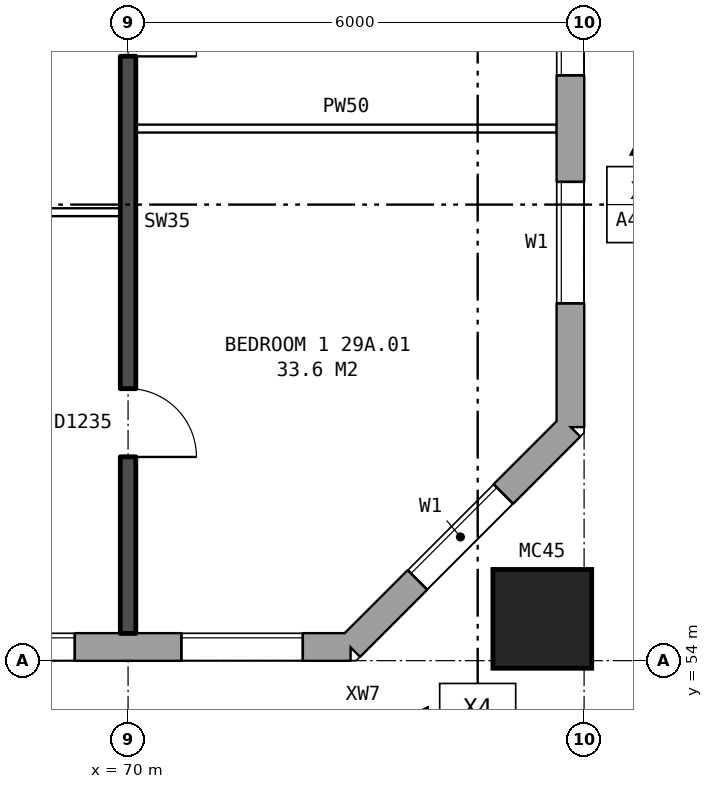
"""IFC4 building model, lengths in metres.
Left out: names, types, materials, properties, quantities, classifications, styles, units other than length and angle.
Written with IfcOpenShell. Run it as: python <this file> out.ifc"""

import sys

from ifc_helpers import new_model, si_unit, direction, frame, frame_2d, origin, origin_2d, place, context, subcontext, project, spatial, rectangle, hollow_rectangle, extrude, element, fill, save


model = new_model("IFC4")
c1 = context("Model", 3, precision=1e-05, world=origin(), true_north=direction((0.0, 1.0)))
c2 = subcontext(c1, "Body", "Model", "MODEL_VIEW")
j1 = project(units=[si_unit("LENGTHUNIT", "METRE"), si_unit("PLANEANGLEUNIT", "RADIAN")], contexts=[c1])
p1 = place(None, origin())
s1 = spatial("IfcSite", under=j1, at=p1, CompositionType="ELEMENT")
p2 = place(p1, origin())
s2 = spatial("IfcBuilding", under=s1, at=p2, CompositionType="ELEMENT")
p3 = place(p2, frame((0.0, 0.0, 105.7)))
s3 = spatial("IfcBuildingStorey", under=s2, at=p3, CompositionType="ELEMENT", Elevation=105.7)
p4 = place(p3, frame((75.45, 54.55, 0.0), z_axis=(0.0, 0.0, 1.0), x_axis=(1.0, 0.0, 0.0)))
e1 = element("IfcColumn", 1, at=p4, inside=s3, PredefinedType="COLUMN", context=c2, shape_type="SweptSolid", body=[
    extrude(hollow_rectangle(XDim=1.3, YDim=1.3, WallThickness=0.07, at=origin_2d()), origin(), (0.0, 0.0, 1.0), 3.1),
])
p5 = place(p3, frame((28.075, 54.18, 0.0), z_axis=(0.0, 0.0, 1.0), x_axis=(1.0, 0.0, 0.0)))
e2 = element("IfcWall", 2, at=p5, inside=s3, PredefinedType="STANDARD", context=c2, shape_type="SweptSolid", body=[
    extrude(rectangle(XDim=44.851, YDim=0.36, at=frame_2d((22.425, 0.0))), origin(), (0.0, 0.0, 1.0), 2.85),
])
p6 = place(p5, frame((0.625, 0.0, 0.8)))
e3 = element("IfcOpeningElement", 3, at=p6, cuts=e2, PredefinedType="OPENING", context=c2, shape_type="SweptSolid", body=[
    extrude(rectangle(XDim=1.6, YDim=1.8, at=frame_2d((0.8, 0.9))), frame((0.0, 0.19, 0.0), z_axis=(0.0, -1.0, 0.0), x_axis=(1.0, 0.0, 0.0)), (0.0, 0.0, 1.0), 0.38),
])
p7 = place(p5, frame((3.625, 0.0, 0.8)))
e4 = element("IfcOpeningElement", 4, at=p7, cuts=e2, PredefinedType="OPENING", context=c2, shape_type="SweptSolid", body=[
    extrude(rectangle(XDim=1.6, YDim=1.8, at=frame_2d((0.8, 0.9))), frame((0.0, 0.19, 0.0), z_axis=(0.0, -1.0, 0.0), x_axis=(1.0, 0.0, 0.0)), (0.0, 0.0, 1.0), 0.38),
])
p8 = place(p5, frame((6.625, 0.0, 0.8)))
e5 = element("IfcOpeningElement", 5, at=p8, cuts=e2, PredefinedType="OPENING", context=c2, shape_type="SweptSolid", body=[
    extrude(rectangle(XDim=1.6, YDim=1.8, at=frame_2d((0.8, 0.9))), frame((0.0, 0.19, 0.0), z_axis=(0.0, -1.0, 0.0), x_axis=(1.0, 0.0, 0.0)), (0.0, 0.0, 1.0), 0.38),
])
p9 = place(p5, frame((8.525, 0.0, 0.8)))
e6 = element("IfcOpeningElement", 6, at=p9, cuts=e2, PredefinedType="OPENING", context=c2, shape_type="SweptSolid", body=[
    extrude(rectangle(XDim=1.4, YDim=1.8, at=frame_2d((0.7, 0.9))), frame((0.0, 0.19, 0.0), z_axis=(0.0, -1.0, 0.0), x_axis=(1.0, 0.0, 0.0)), (0.0, 0.0, 1.0), 0.38),
])
p10 = place(p5, frame((13.175, 0.0, 0.8)))
e7 = element("IfcOpeningElement", 7, at=p10, cuts=e2, PredefinedType="OPENING", context=c2, shape_type="SweptSolid", body=[
    extrude(rectangle(XDim=1.0, YDim=0.9, at=frame_2d((0.5, 0.45))), frame((0.0, 0.19, 0.0), z_axis=(0.0, -1.0, 0.0), x_axis=(1.0, 0.0, 0.0)), (0.0, 0.0, 1.0), 0.38),
])
p11 = place(p5, frame((15.625, 0.0, 0.8)))
e8 = element("IfcOpeningElement", 8, at=p11, cuts=e2, PredefinedType="OPENING", context=c2, shape_type="SweptSolid", body=[
    extrude(rectangle(XDim=1.6, YDim=1.8, at=frame_2d((0.8, 0.9))), frame((0.0, 0.19, 0.0), z_axis=(0.0, -1.0, 0.0), x_axis=(1.0, 0.0, 0.0)), (0.0, 0.0, 1.0), 0.38),
])
p12 = place(p5, frame((18.625, 0.0, 0.8)))
e9 = element("IfcOpeningElement", 9, at=p12, cuts=e2, PredefinedType="OPENING", context=c2, shape_type="SweptSolid", body=[
    extrude(rectangle(XDim=1.6, YDim=1.8, at=frame_2d((0.8, 0.9))), frame((0.0, 0.19, 0.0), z_axis=(0.0, -1.0, 0.0), x_axis=(1.0, 0.0, 0.0)), (0.0, 0.0, 1.0), 0.38),
])
p13 = place(p5, frame((21.625, 0.0, 0.8)))
e10 = element("IfcOpeningElement", 10, at=p13, cuts=e2, PredefinedType="OPENING", context=c2, shape_type="SweptSolid", body=[
    extrude(rectangle(XDim=1.6, YDim=1.8, at=frame_2d((0.8, 0.9))), frame((0.0, 0.19, 0.0), z_axis=(0.0, -1.0, 0.0), x_axis=(1.0, 0.0, 0.0)), (0.0, 0.0, 1.0), 0.38),
])
p14 = place(p5, frame((24.625, 0.0, 0.8)))
e11 = element("IfcOpeningElement", 11, at=p14, cuts=e2, PredefinedType="OPENING", context=c2, shape_type="SweptSolid", body=[
    extrude(rectangle(XDim=1.6, YDim=1.8, at=frame_2d((0.8, 0.9))), frame((0.0, 0.19, 0.0), z_axis=(0.0, -1.0, 0.0), x_axis=(1.0, 0.0, 0.0)), (0.0, 0.0, 1.0), 0.38),
])
p15 = place(p5, frame((27.625, 0.0, 0.8)))
e12 = element("IfcOpeningElement", 12, at=p15, cuts=e2, PredefinedType="OPENING", context=c2, shape_type="SweptSolid", body=[
    extrude(rectangle(XDim=1.6, YDim=1.8, at=frame_2d((0.8, 0.9))), frame((0.0, 0.19, 0.0), z_axis=(0.0, -1.0, 0.0), x_axis=(1.0, 0.0, 0.0)), (0.0, 0.0, 1.0), 0.38),
])
p16 = place(p5, frame((30.125, 0.0, 0.15)))
e13 = element("IfcOpeningElement", 13, at=p16, cuts=e2, PredefinedType="OPENING", context=c2, shape_type="SweptSolid", body=[
    extrude(rectangle(XDim=1.2, YDim=1.8, at=frame_2d((0.6, 0.9))), frame((0.0, 0.19, 0.0), z_axis=(0.0, -1.0, 0.0), x_axis=(1.0, 0.0, 0.0)), (0.0, 0.0, 1.0), 0.38),
])
p17 = place(p5, frame((33.075, 0.0, 1.6)))
e14 = element("IfcOpeningElement", 14, at=p17, cuts=e2, PredefinedType="OPENING", context=c2, shape_type="SweptSolid", body=[
    extrude(rectangle(XDim=0.6, YDim=0.9, at=frame_2d((0.3, 0.45))), frame((0.0, 0.19, 0.0), z_axis=(0.0, -1.0, 0.0), x_axis=(1.0, 0.0, 0.0)), (0.0, 0.0, 1.0), 0.38),
])
p18 = place(p5, frame((36.625, 0.0, 0.8)))
e15 = element("IfcOpeningElement", 15, at=p18, cuts=e2, PredefinedType="OPENING", context=c2, shape_type="SweptSolid", body=[
    extrude(rectangle(XDim=1.6, YDim=1.8, at=frame_2d((0.8, 0.9))), frame((0.0, 0.19, 0.0), z_axis=(0.0, -1.0, 0.0), x_axis=(1.0, 0.0, 0.0)), (0.0, 0.0, 1.0), 0.38),
])
p19 = place(p5, frame((39.625, 0.0, 0.8)))
e16 = element("IfcOpeningElement", 16, at=p19, cuts=e2, PredefinedType="OPENING", context=c2, shape_type="SweptSolid", body=[
    extrude(rectangle(XDim=1.6, YDim=1.8, at=frame_2d((0.8, 0.9))), frame((0.0, 0.19, 0.0), z_axis=(0.0, -1.0, 0.0), x_axis=(1.0, 0.0, 0.0)), (0.0, 0.0, 1.0), 0.38),
])
p20 = place(p5, frame((42.625, 0.0, 0.8)))
e17 = element("IfcOpeningElement", 17, at=p20, cuts=e2, PredefinedType="OPENING", context=c2, shape_type="SweptSolid", body=[
    extrude(rectangle(XDim=1.6, YDim=1.8, at=frame_2d((0.8, 0.9))), frame((0.0, 0.19, 0.0), z_axis=(0.0, -1.0, 0.0), x_axis=(1.0, 0.0, 0.0)), (0.0, 0.0, 1.0), 0.38),
])
p21 = place(p5, frame((10.225, 0.0, 1.1)))
e18 = element("IfcOpeningElement", 18, at=p21, cuts=e2, PredefinedType="OPENING", context=c2, shape_type="SweptSolid", body=[
    extrude(rectangle(XDim=0.8, YDim=1.5, at=frame_2d((0.4, 0.75))), frame((0.0, 0.19, 0.0), z_axis=(0.0, -1.0, 0.0), x_axis=(1.0, 0.0, 0.0)), (0.0, 0.0, 1.0), 0.38),
])
p22 = place(p5, frame((14.475, 0.0, 0.8)))
e19 = element("IfcOpeningElement", 19, at=p22, cuts=e2, PredefinedType="OPENING", context=c2, shape_type="SweptSolid", body=[
    extrude(rectangle(XDim=0.8, YDim=1.8, at=frame_2d((0.4, 0.9))), frame((0.0, 0.19, 0.0), z_axis=(0.0, -1.0, 0.0), x_axis=(1.0, 0.0, 0.0)), (0.0, 0.0, 1.0), 0.38),
])
p23 = place(p5, frame((31.625, 0.0, 0.25)))
e20 = element("IfcOpeningElement", 20, at=p23, cuts=e2, PredefinedType="OPENING", context=c2, shape_type="SweptSolid", body=[
    extrude(rectangle(XDim=0.8, YDim=0.9, at=frame_2d((0.4, 0.45))), frame((0.0, 0.19, 0.0), z_axis=(0.0, -1.0, 0.0), x_axis=(1.0, 0.0, 0.0)), (0.0, 0.0, 1.0), 0.38),
])
p24 = place(p5, frame((34.125, 0.0, 0.8)))
e21 = element("IfcOpeningElement", 21, at=p24, cuts=e2, PredefinedType="OPENING", context=c2, shape_type="SweptSolid", body=[
    extrude(rectangle(XDim=1.6, YDim=1.8, at=frame_2d((0.8, 0.9))), frame((0.0, 0.19, 0.0), z_axis=(0.0, -1.0, 0.0), x_axis=(1.0, 0.0, 0.0)), (0.0, 0.0, 1.0), 0.38),
])
p25 = place(p3, frame((72.925, 54.18, 0.0), z_axis=(0.0, 0.0, 1.0), x_axis=(0.707106781187, 0.707106781187, 0.0)))
e22 = element("IfcWall", 22, at=p25, inside=s3, PredefinedType="STANDARD", context=c2, shape_type="SweptSolid", body=[
    extrude(rectangle(XDim=4.094, YDim=0.36, at=frame_2d((2.047, 0.0))), origin(), (0.0, 0.0, 1.0), 2.85),
])
p26 = place(p25, frame((1.247, 0.0, 0.8)))
e23 = element("IfcOpeningElement", 23, at=p26, cuts=e22, PredefinedType="OPENING", context=c2, shape_type="SweptSolid", body=[
    extrude(rectangle(XDim=1.6, YDim=1.8, at=frame_2d((0.8, 0.9))), frame((0.0, 0.19, 0.0), z_axis=(0.0, -1.0, 0.0), x_axis=(1.0, 0.0, 0.0)), (0.0, 0.0, 1.0), 0.38),
])
p27 = place(p3, frame((75.82, 57.075, 0.0), z_axis=(0.0, 0.0, 1.0), x_axis=(0.0, 1.0, 0.0)))
e24 = element("IfcWall", 24, at=p27, inside=s3, PredefinedType="STANDARD", context=c2, shape_type="SweptSolid", body=[
    extrude(rectangle(XDim=25.851, YDim=0.36, at=frame_2d((12.925, 0.0))), origin(), (0.0, 0.0, 1.0), 2.85),
])
p28 = place(p27, frame((1.625, 0.0, 0.8)))
e25 = element("IfcOpeningElement", 25, at=p28, cuts=e24, PredefinedType="OPENING", context=c2, shape_type="SweptSolid", body=[
    extrude(rectangle(XDim=1.6, YDim=1.8, at=frame_2d((0.8, 0.9))), frame((0.0, 0.19, 0.0), z_axis=(0.0, -1.0, 0.0), x_axis=(1.0, 0.0, 0.0)), (0.0, 0.0, 1.0), 0.38),
])
p29 = place(p27, frame((4.625, 0.0, 0.8)))
e26 = element("IfcOpeningElement", 26, at=p29, cuts=e24, PredefinedType="OPENING", context=c2, shape_type="SweptSolid", body=[
    extrude(rectangle(XDim=1.6, YDim=1.8, at=frame_2d((0.8, 0.9))), frame((0.0, 0.19, 0.0), z_axis=(0.0, -1.0, 0.0), x_axis=(1.0, 0.0, 0.0)), (0.0, 0.0, 1.0), 0.38),
])
p30 = place(p27, frame((19.625, 0.0, 0.8)))
e27 = element("IfcOpeningElement", 27, at=p30, cuts=e24, PredefinedType="OPENING", context=c2, shape_type="SweptSolid", body=[
    extrude(rectangle(XDim=1.6, YDim=1.8, at=frame_2d((0.8, 0.9))), frame((0.0, 0.19, 0.0), z_axis=(0.0, -1.0, 0.0), x_axis=(1.0, 0.0, 0.0)), (0.0, 0.0, 1.0), 0.38),
])
p31 = place(p27, frame((22.625, 0.0, 0.8)))
e28 = element("IfcOpeningElement", 28, at=p31, cuts=e24, PredefinedType="OPENING", context=c2, shape_type="SweptSolid", body=[
    extrude(rectangle(XDim=1.6, YDim=1.8, at=frame_2d((0.8, 0.9))), frame((0.0, 0.19, 0.0), z_axis=(0.0, -1.0, 0.0), x_axis=(1.0, 0.0, 0.0)), (0.0, 0.0, 1.0), 0.38),
])
p32 = place(p3, frame((64.1, 59.9, 0.0), z_axis=(0.0, 0.0, 1.0), x_axis=(1.0, 0.0, 0.0)))
e29 = element("IfcWall", 29, at=p32, inside=s3, PredefinedType="PARTITIONING", context=c2, shape_type="SweptSolid", body=[
    extrude(rectangle(XDim=5.8, YDim=0.1, at=frame_2d((2.9, 0.0))), origin(), (0.0, 0.0, 1.0), 2.85),
])
p33 = place(p32, frame((3.6, 0.0, 0.0)))
e30 = element("IfcOpeningElement", 30, at=p33, cuts=e29, PredefinedType="OPENING", context=c2, shape_type="SweptSolid", body=[
    extrude(rectangle(XDim=0.9, YDim=2.1, at=frame_2d((0.45, 1.05))), frame((0.0, 0.06, 0.0), z_axis=(0.0, -1.0, 0.0), x_axis=(1.0, 0.0, 0.0)), (0.0, 0.0, 1.0), 0.12),
])
p34 = place(p32, frame((0.7, 0.0, 0.0)))
e31 = element("IfcOpeningElement", 31, at=p34, cuts=e29, PredefinedType="OPENING", context=c2, shape_type="SweptSolid", body=[
    extrude(rectangle(XDim=0.9, YDim=2.1, at=frame_2d((0.45, 1.05))), frame((0.0, 0.06, 0.0), z_axis=(0.0, -1.0, 0.0), x_axis=(1.0, 0.0, 0.0)), (0.0, 0.0, 1.0), 0.12),
])
p35 = place(p3, frame((70.1, 61.0, 0.0), z_axis=(0.0, 0.0, 1.0), x_axis=(1.0, 0.0, 0.0)))
e32 = element("IfcWall", 32, at=p35, inside=s3, PredefinedType="PARTITIONING", context=c2, shape_type="SweptSolid", body=[
    extrude(rectangle(XDim=5.54, YDim=0.1, at=frame_2d((2.77, 0.0))), origin(), (0.0, 0.0, 1.0), 2.85),
])
p36 = place(p3, frame((70.0, 54.36, 0.0), z_axis=(0.0, 0.0, 1.0), x_axis=(0.0, 1.0, 0.0)))
e33 = element("IfcWall", 33, at=p36, inside=s3, PredefinedType="SOLIDWALL", context=c2, shape_type="SweptSolid", body=[
    extrude(rectangle(XDim=9.44, YDim=0.2, at=frame_2d((4.72, 0.0))), origin(), (0.0, 0.0, 1.0), 2.85),
])
p37 = place(p36, frame((2.32, 0.0, 0.0)))
e34 = element("IfcOpeningElement", 34, at=p37, cuts=e33, PredefinedType="OPENING", context=c2, shape_type="SweptSolid", body=[
    extrude(rectangle(XDim=0.9, YDim=2.1, at=frame_2d((0.45, 1.05))), frame((0.0, 0.11, 0.0), z_axis=(0.0, -1.0, 0.0), x_axis=(1.0, 0.0, 0.0)), (0.0, 0.0, 1.0), 0.22),
])
p38 = place(p36, frame((7.59, 0.0, 0.0)))
e35 = element("IfcOpeningElement", 35, at=p38, cuts=e33, PredefinedType="OPENING", context=c2, shape_type="SweptSolid", body=[
    extrude(rectangle(XDim=0.9, YDim=2.1, at=frame_2d((0.45, 1.05))), frame((0.0, 0.11, 0.0), z_axis=(0.0, -1.0, 0.0), x_axis=(1.0, 0.0, 0.0)), (0.0, 0.0, 1.0), 0.22),
])
p39 = place(p19, origin())
e36 = element("IfcWindow", 36, at=p39, inside=s3, PartitioningType="SINGLE_PANEL", PredefinedType="WINDOW", context=c2, shape_type="SweptSolid", body=[
    extrude(rectangle(XDim=1.6, YDim=1.8, at=frame_2d((0.8, 0.9))), frame((0.0, 0.15, 0.0), z_axis=(0.0, -1.0, 0.0), x_axis=(1.0, 0.0, 0.0)), (0.0, 0.0, 1.0), 0.06),
])
fill(e16, e36)
p40 = place(p20, origin())
e37 = element("IfcWindow", 37, at=p40, inside=s3, PartitioningType="SINGLE_PANEL", PredefinedType="WINDOW", context=c2, shape_type="SweptSolid", body=[
    extrude(rectangle(XDim=1.6, YDim=1.8, at=frame_2d((0.8, 0.9))), frame((0.0, 0.15, 0.0), z_axis=(0.0, -1.0, 0.0), x_axis=(1.0, 0.0, 0.0)), (0.0, 0.0, 1.0), 0.06),
])
fill(e17, e37)
p41 = place(p26, origin())
e38 = element("IfcWindow", 38, at=p41, inside=s3, PartitioningType="SINGLE_PANEL", PredefinedType="WINDOW", context=c2, shape_type="SweptSolid", body=[
    extrude(rectangle(XDim=1.6, YDim=1.8, at=frame_2d((0.8, 0.9))), frame((0.0, 0.15, 0.0), z_axis=(0.0, -1.0, 0.0), x_axis=(1.0, 0.0, 0.0)), (0.0, 0.0, 1.0), 0.06),
])
fill(e23, e38)
p42 = place(p28, origin())
e39 = element("IfcWindow", 39, at=p42, inside=s3, PartitioningType="SINGLE_PANEL", PredefinedType="WINDOW", context=c2, shape_type="SweptSolid", body=[
    extrude(rectangle(XDim=1.6, YDim=1.8, at=frame_2d((0.8, 0.9))), frame((0.0, 0.15, 0.0), z_axis=(0.0, -1.0, 0.0), x_axis=(1.0, 0.0, 0.0)), (0.0, 0.0, 1.0), 0.06),
])
fill(e25, e39)
p43 = place(p29, origin())
e40 = element("IfcWindow", 40, at=p43, inside=s3, PartitioningType="SINGLE_PANEL", PredefinedType="WINDOW", context=c2, shape_type="SweptSolid", body=[
    extrude(rectangle(XDim=1.6, YDim=1.8, at=frame_2d((0.8, 0.9))), frame((0.0, 0.15, 0.0), z_axis=(0.0, -1.0, 0.0), x_axis=(1.0, 0.0, 0.0)), (0.0, 0.0, 1.0), 0.06),
])
fill(e26, e40)
p44 = place(p37, frame((0.9, 0.0, 0.0), z_axis=(0.0, 0.0, 1.0), x_axis=(-1.0, 0.0, 0.0)))
e41 = element("IfcDoor", 41, at=p44, inside=s3, OperationType="SINGLE_SWING_RIGHT", PredefinedType="DOOR", context=c2, shape_type="SweptSolid", body=[
    extrude(rectangle(XDim=0.9, YDim=2.1, at=frame_2d((0.45, 1.05))), frame((0.0, 0.025, 0.0), z_axis=(0.0, -1.0, 0.0), x_axis=(1.0, 0.0, 0.0)), (0.0, 0.0, 1.0), 0.05),
])
fill(e34, e41)
p45 = place(p38, frame((0.9, 0.0, 0.0), z_axis=(0.0, 0.0, 1.0), x_axis=(-1.0, 0.0, 0.0)))
e42 = element("IfcDoor", 42, at=p45, inside=s3, OperationType="SINGLE_SWING_RIGHT", PredefinedType="DOOR", context=c2, shape_type="SweptSolid", body=[
    extrude(rectangle(XDim=0.9, YDim=2.1, at=frame_2d((0.45, 1.05))), frame((0.0, 0.025, 0.0), z_axis=(0.0, -1.0, 0.0), x_axis=(1.0, 0.0, 0.0)), (0.0, 0.0, 1.0), 0.05),
])
fill(e35, e42)
save(model, sys.argv[1])
